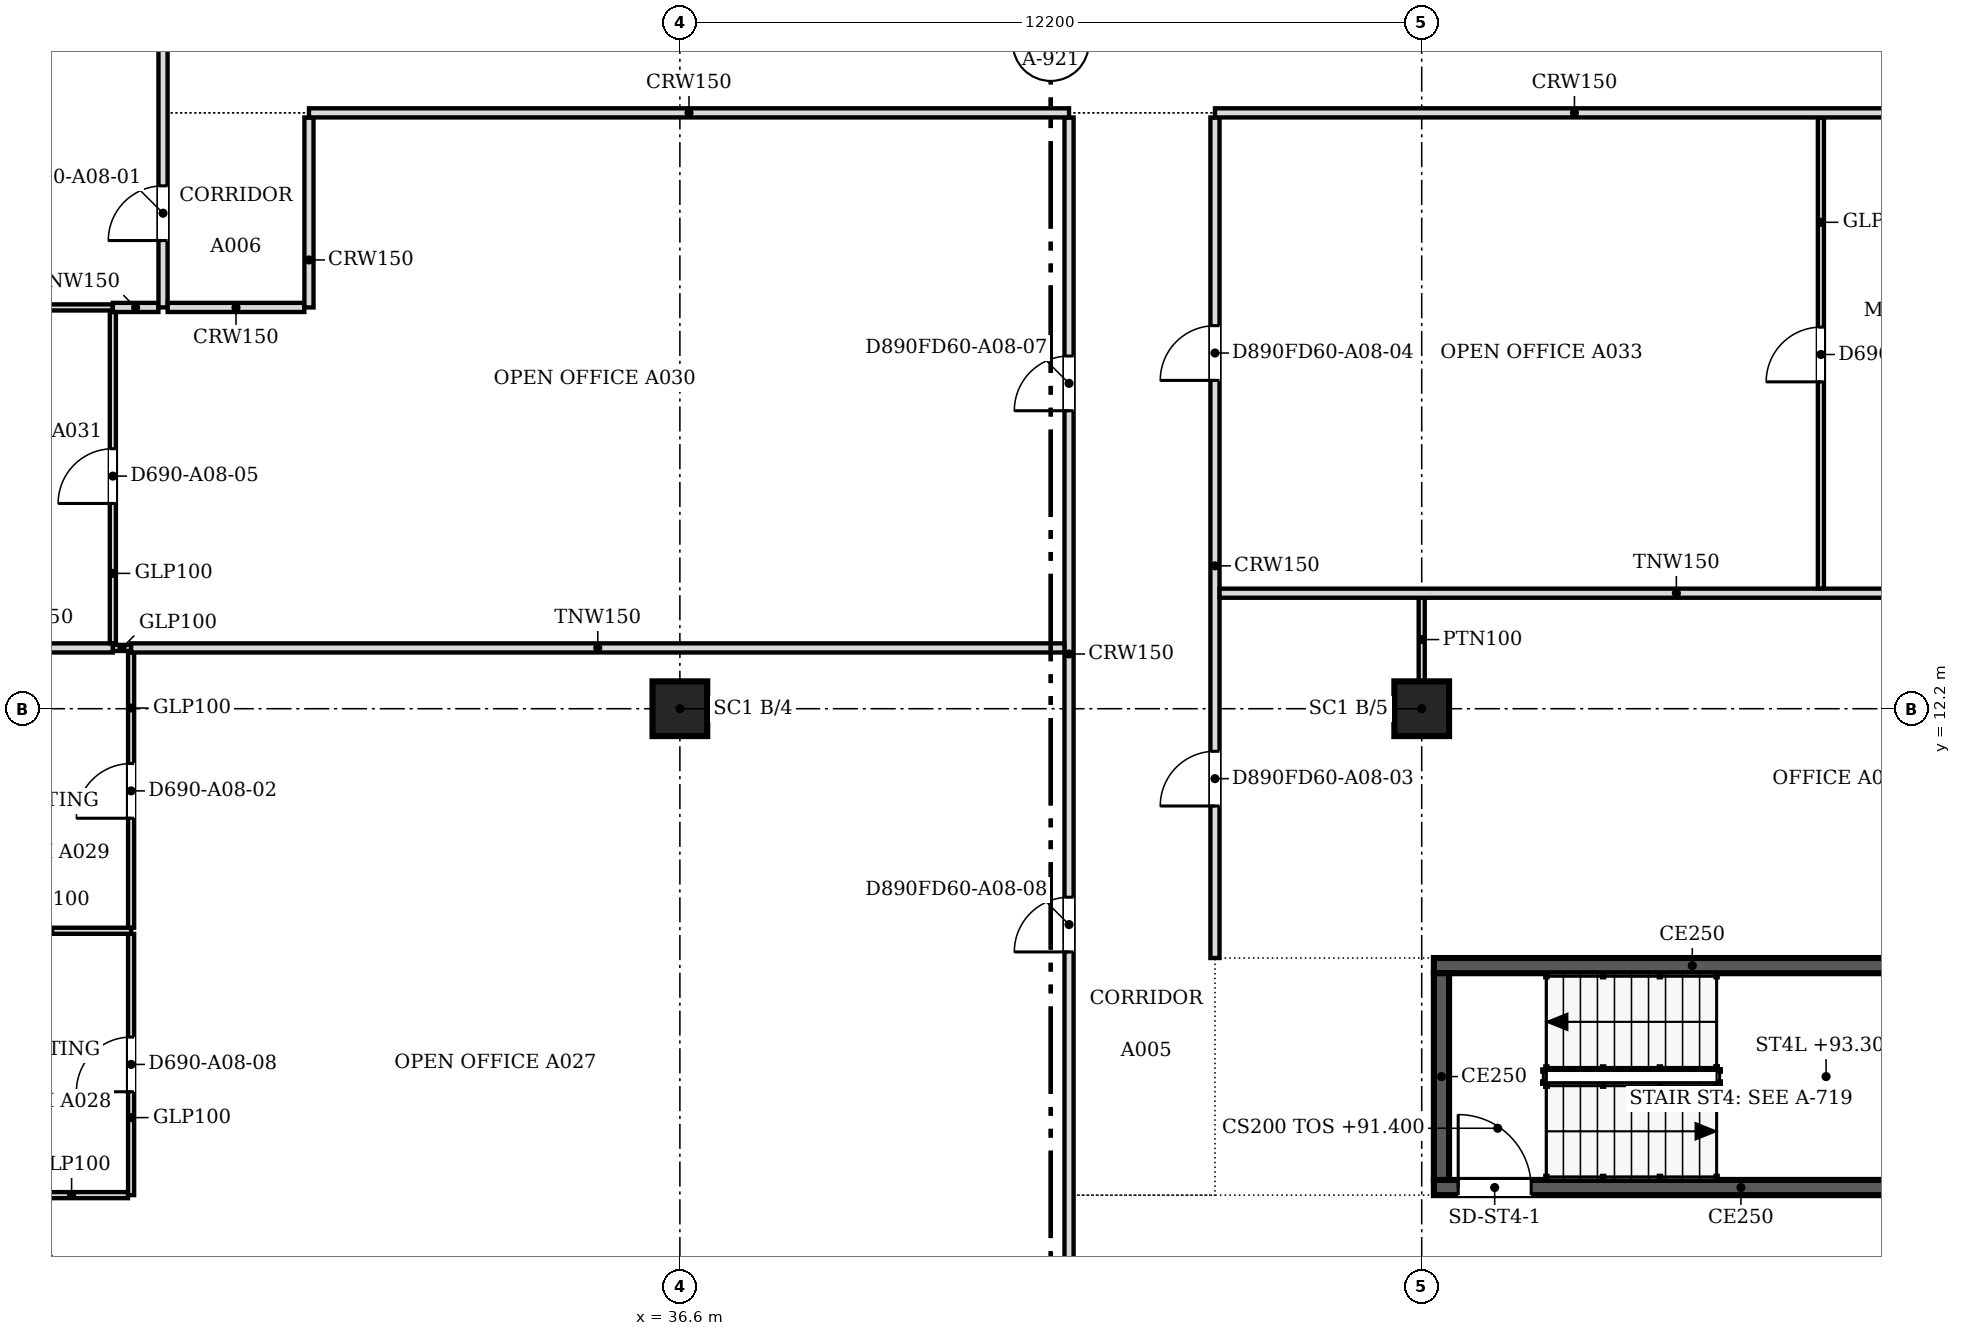
"""IFC4 building model, lengths in metres.
Left out: names, types, materials, properties, quantities, classifications, styles, units other than length and angle.
Written with IfcOpenShell. Run it as: python <this file> out.ifc"""

import sys

from ifc_helpers import new_model, si_unit, direction, frame, frame_2d, origin, origin_2d, place, context, subcontext, project, spatial, polyline, rectangle, outline, extrude, faceted_brep, source, transform, mapped, element, fill, save


model = new_model("IFC4")
c1 = context("Model", 3, precision=1e-05, world=origin(), true_north=direction((0.0, 1.0)))
c2 = subcontext(c1, "Body", "Model", "MODEL_VIEW")
j1 = project(units=[si_unit("LENGTHUNIT", "METRE"), si_unit("PLANEANGLEUNIT", "RADIAN")], contexts=[c1])
p1 = place(None, origin())
s1 = spatial("IfcSite", under=j1, at=p1, CompositionType="ELEMENT")
p2 = place(p1, origin())
s2 = spatial("IfcBuilding", under=s1, at=p2, CompositionType="ELEMENT")
p3 = place(p2, frame((0.0, 0.0, 91.4)))
s3 = spatial("IfcBuildingStorey", under=s2, at=p3, CompositionType="ELEMENT", Elevation=91.4)
for number, where, z_axis, x_axis in (
    (1, (36.6, 12.2, 0.0), (0.0, 0.0, 1.0), (1.0, 0.0, 0.0)),
    (2, (48.8, 12.2, 0.0), (0.0, 0.0, 1.0), (1.0, 0.0, 0.0)),
):
    element("IfcColumn", number, at=place(p3, frame(where, z_axis=z_axis, x_axis=x_axis)), inside=s3, PredefinedType="COLUMN", context=c2, shape_type="SweptSolid", body=[
        extrude(rectangle(XDim=0.9, YDim=0.9, at=origin_2d()), origin(), (0.0, 0.0, 1.0), 3.6),
    ])
m1 = source(origin(), c2, "Body", "Brep", [
    faceted_brep([(0.053, -0.25, 0.0), (2.997, -0.25, 3.8), (0.053, -0.25, 7.6), (0.0, -0.25, 7.532), (0.0, -0.25, 0.068), (0.106, 0.25, 7.531), (2.944, 0.25, 3.868), (2.944, 0.25, 3.732), (0.106, 0.25, 0.068), (2.997, 0.0, 3.8), (0.053, 0.0, 0.0), (0.053, 0.0, 7.6)], [[[0, 1, 2, 3, 4]], [[5, 6, 7, 8]], [[8, 7, 9, 1, 0, 10]], [[6, 5, 11, 2, 1, 9]], [[3, 2, 11]], [[10, 0, 4]], [[8, 10, 4, 3, 11, 5]], [[9, 7, 6]]]),
])
p4 = place(p3, frame((25.675, 3.431, -3.8), z_axis=(0.0, 0.0, 1.0), x_axis=(0.707106781187, -0.707106781187, 0.0)))
e3 = element("IfcWall", 3, at=p4, inside=s3, PredefinedType="SOLIDWALL", context=c2, shape_type="MappedRepresentation", body=[
    mapped(m1, transform((0.0, 0.0, 0.0), scale=1.0)),
])
m2 = source(origin(), c2, "Body", "SweptSolid", [
    extrude(outline(polyline([(0.253, 0.666), (2.681, 3.8), (0.253, 6.934), (0.253, 0.666)])), frame((0.0, 0.26, 0.0), z_axis=(0.0, -1.0, 0.0), x_axis=(1.0, 0.0, 0.0)), (0.0, 0.0, 1.0), 0.52),
])
p5 = place(p4, origin())
e4 = element("IfcOpeningElement", 4, at=p5, cuts=e3, PredefinedType="OPENING", context=c2, shape_type="MappedRepresentation", body=[
    mapped(m2, transform((0.0, 0.0, 0.0), scale=1.0)),
])
p6 = place(p2, frame((0.0, 0.0, 95.2)))
s4 = spatial("IfcBuildingStorey", under=s2, at=p6, CompositionType="ELEMENT", Elevation=95.2)
m3 = source(origin(), c2, "Body", "Brep", [
    faceted_brep([(2.944, -0.25, 0.0), (2.997, -0.25, 0.068), (2.997, -0.25, 7.532), (2.944, -0.25, 7.6), (0.0, -0.25, 3.8), (0.053, 0.25, 3.868), (2.891, 0.25, 7.532), (2.891, 0.25, 0.068), (0.053, 0.25, 3.732), (2.944, 0.0, 0.0), (2.944, 0.0, 7.6), (0.0, 0.0, 3.8)], [[[0, 1, 2, 3, 4]], [[5, 6, 7, 8]], [[1, 0, 9]], [[10, 3, 2]], [[6, 5, 11, 4, 3, 10]], [[8, 7, 9, 0, 4, 11]], [[8, 11, 5]], [[1, 9, 7, 6, 10, 2]]]),
])
p7 = place(p6, frame((25.712, 3.394, -3.8), z_axis=(0.0, 0.0, 1.0), x_axis=(0.707066050402, -0.707147509625, 0.0)))
e5 = element("IfcWall", 5, at=p7, inside=s4, PredefinedType="SOLIDWALL", context=c2, shape_type="MappedRepresentation", body=[
    mapped(m3, transform((0.0, 0.0, 0.0), scale=1.0)),
])
m4 = source(origin(), c2, "Body", "SweptSolid", [
    extrude(outline(polyline([(2.744, 6.934), (0.316, 3.8), (2.744, 0.667), (2.744, 6.934)])), frame((0.0, 0.26, 0.0), z_axis=(0.0, -1.0, 0.0), x_axis=(1.0, 0.0, 0.0)), (0.0, 0.0, 1.0), 0.52),
])
p8 = place(p7, origin())
e6 = element("IfcOpeningElement", 6, at=p8, cuts=e5, PredefinedType="OPENING", context=c2, shape_type="MappedRepresentation", body=[
    mapped(m4, transform((0.0, 0.0, 0.0), scale=1.0)),
])
p9 = place(p3, frame((57.5, 4.325, 0.0), z_axis=(0.0, 0.0, 1.0), x_axis=(-1.0, 0.0, 0.0)))
e7 = element("IfcWall", 7, at=p9, inside=s3, PredefinedType="SOLIDWALL", context=c2, shape_type="SweptSolid", body=[
    extrude(rectangle(XDim=8.5, YDim=0.25, at=frame_2d((4.25, 0.0))), origin(), (0.0, 0.0, 1.0), 3.8),
])
m5 = source(origin(), c2, "Body", "SweptSolid", [
    extrude(rectangle(XDim=1.2, YDim=2.1, at=frame_2d((0.6, 1.05))), frame((0.0, 0.135, 0.0), z_axis=(0.0, -1.0, 0.0), x_axis=(1.0, 0.0, 0.0)), (0.0, 0.0, 1.0), 0.27),
])
p10 = place(p9, frame((6.9, 0.0, 0.0)))
e8 = element("IfcOpeningElement", 8, at=p10, cuts=e7, PredefinedType="OPENING", context=c2, shape_type="MappedRepresentation", body=[
    mapped(m5, transform((0.0, 0.0, 0.0), scale=1.0)),
])
p11 = place(p3, frame((49.125, 4.45, 0.0), z_axis=(0.0, 0.0, 1.0), x_axis=(0.0, 1.0, 0.0)))
e9 = element("IfcWall", 9, at=p11, inside=s3, PredefinedType="SOLIDWALL", context=c2, shape_type="SweptSolid", body=[
    extrude(rectangle(XDim=3.4, YDim=0.25, at=frame_2d((1.7, 0.0))), origin(), (0.0, 0.0, 1.0), 3.8),
])
p12 = place(p3, frame((49.0, 7.975, 0.0), z_axis=(0.0, 0.0, 1.0), x_axis=(1.0, 0.0, 0.0)))
e10 = element("IfcWall", 10, at=p12, inside=s3, PredefinedType="SOLIDWALL", context=c2, shape_type="SweptSolid", body=[
    extrude(rectangle(XDim=8.5, YDim=0.25, at=frame_2d((4.25, 0.0))), origin(), (0.0, 0.0, 1.0), 3.8),
])
p13 = place(p3, frame((43.0, 0.5, 0.0), z_axis=(0.0, 0.0, 1.0), x_axis=(0.0, 1.0, 0.0)))
e11 = element("IfcWall", 11, at=p13, inside=s3, PredefinedType="PARTITIONING", context=c2, shape_type="SweptSolid", body=[
    extrude(rectangle(XDim=21.424, YDim=0.15, at=frame_2d((10.712, 0.0))), origin(), (0.0, 0.0, 1.0), 2.895),
])
m6 = source(origin(), c2, "Body", "SweptSolid", [
    extrude(rectangle(XDim=0.9, YDim=2.1, at=frame_2d((0.45, 1.05))), frame((0.0, 0.085, 0.0), z_axis=(0.0, -1.0, 0.0), x_axis=(1.0, 0.0, 0.0)), (0.0, 0.0, 1.0), 0.17),
])
p14 = place(p13, frame((16.601, 0.0, 0.0)))
e12 = element("IfcOpeningElement", 12, at=p14, cuts=e11, PredefinedType="OPENING", context=c2, shape_type="MappedRepresentation", body=[
    mapped(m6, transform((0.0, 0.0, 0.0), scale=1.0)),
])
p15 = place(p13, frame((7.7, 0.0, 0.0)))
e13 = element("IfcOpeningElement", 13, at=p15, cuts=e11, PredefinedType="OPENING", context=c2, shape_type="MappedRepresentation", body=[
    mapped(m6, transform((0.0, 0.0, 0.0), scale=1.0)),
])
p16 = place(p3, frame((25.669, 4.2, 0.0), z_axis=(0.0, 0.0, 1.0), x_axis=(1.0, 0.0, 0.0)))
e14 = element("IfcWall", 14, at=p16, inside=s3, PredefinedType="PARTITIONING", context=c2, shape_type="SweptSolid", body=[
    extrude(rectangle(XDim=1.855, YDim=0.1, at=frame_2d((0.928, 0.0))), origin(), (0.0, 0.0, 1.0), 2.895),
])
p17 = place(p3, frame((27.575, 4.2, 0.0), z_axis=(0.0, 0.0, 1.0), x_axis=(0.0, 1.0, 0.0)))
e15 = element("IfcWall", 15, at=p17, inside=s3, PredefinedType="PARTITIONING", context=c2, shape_type="SweptSolid", body=[
    extrude(rectangle(XDim=4.297, YDim=0.1, at=frame_2d((2.148, 0.0))), origin(), (0.0, 0.0, 1.0), 2.895),
])
m7 = source(origin(), c2, "Body", "SweptSolid", [
    extrude(rectangle(XDim=0.9, YDim=2.1, at=frame_2d((0.45, 1.05))), frame((0.0, 0.06, 0.0), z_axis=(0.0, -1.0, 0.0), x_axis=(1.0, 0.0, 0.0)), (0.0, 0.0, 1.0), 0.12),
])
p18 = place(p17, frame((1.7, 0.0, 0.0)))
e16 = element("IfcOpeningElement", 16, at=p18, cuts=e15, PredefinedType="OPENING", context=c2, shape_type="MappedRepresentation", body=[
    mapped(m7, transform((0.0, 0.0, 0.0), scale=1.0)),
])
p19 = place(p3, frame((45.4, 21.924, 0.0), z_axis=(0.0, 0.0, 1.0), x_axis=(0.0, -1.0, 0.0)))
e17 = element("IfcWall", 17, at=p19, inside=s3, PredefinedType="PARTITIONING", context=c2, shape_type="SweptSolid", body=[
    extrude(rectangle(XDim=13.824, YDim=0.15, at=frame_2d((6.912, 0.0))), origin(), (0.0, 0.0, 1.0), 2.895),
])
p20 = place(p19, frame((10.424, 0.0, 0.0)))
e18 = element("IfcOpeningElement", 18, at=p20, cuts=e17, PredefinedType="OPENING", context=c2, shape_type="MappedRepresentation", body=[
    mapped(m6, transform((0.0, 0.0, 0.0), scale=1.0)),
])
p21 = place(p19, frame((3.424, 0.0, 0.0)))
e19 = element("IfcOpeningElement", 19, at=p21, cuts=e17, PredefinedType="OPENING", context=c2, shape_type="MappedRepresentation", body=[
    mapped(m6, transform((0.0, 0.0, 0.0), scale=1.0)),
])
p22 = place(p3, frame((24.9, 8.548, 0.0), z_axis=(0.0, 0.0, 1.0), x_axis=(1.0, 0.0, 0.0)))
e20 = element("IfcWall", 20, at=p22, inside=s3, PredefinedType="PARTITIONING", context=c2, shape_type="SweptSolid", body=[
    extrude(rectangle(XDim=2.675, YDim=0.1, at=frame_2d((1.337, 0.0))), origin(), (0.0, 0.0, 1.0), 2.895),
])
p23 = place(p3, frame((27.575, 8.599, 0.0), z_axis=(0.0, 0.0, 1.0), x_axis=(0.0, 1.0, 0.0)))
e21 = element("IfcWall", 21, at=p23, inside=s3, PredefinedType="PARTITIONING", context=c2, shape_type="SweptSolid", body=[
    extrude(rectangle(XDim=4.525, YDim=0.1, at=frame_2d((2.263, 0.0))), origin(), (0.0, 0.0, 1.0), 2.895),
])
p24 = place(p23, frame((1.8, 0.0, 0.0)))
e22 = element("IfcOpeningElement", 22, at=p24, cuts=e21, PredefinedType="OPENING", context=c2, shape_type="MappedRepresentation", body=[
    mapped(m7, transform((0.0, 0.0, 0.0), scale=1.0)),
])
p25 = place(p3, frame((48.8, 12.65, 0.0), z_axis=(0.0, 0.0, 1.0), x_axis=(0.0, 1.0, 0.0)))
e23 = element("IfcWall", 23, at=p25, inside=s3, PredefinedType="PARTITIONING", context=c2, shape_type="SweptSolid", body=[
    extrude(rectangle(XDim=1.375, YDim=0.1, at=frame_2d((0.688, 0.0))), origin(), (0.0, 0.0, 1.0), 2.895),
])
p26 = place(p3, frame((24.55, 13.2, 0.0), z_axis=(0.0, 0.0, 1.0), x_axis=(1.0, 0.0, 0.0)))
e24 = element("IfcWall", 24, at=p26, inside=s3, PredefinedType="PARTITIONING", context=c2, shape_type="SweptSolid", body=[
    extrude(rectangle(XDim=2.725, YDim=0.15, at=frame_2d((1.362, 0.0))), origin(), (0.0, 0.0, 1.0), 2.895),
])
p27 = place(p3, frame((27.276, 13.2, 0.0), z_axis=(0.0, 0.0, 1.0), x_axis=(1.0, 0.0, 0.0)))
e25 = element("IfcWall", 25, at=p27, inside=s3, PredefinedType="PARTITIONING", context=c2, shape_type="SweptSolid", body=[
    extrude(rectangle(XDim=0.298, YDim=0.1, at=frame_2d((0.149, 0.0))), origin(), (0.0, 0.0, 1.0), 2.895),
])
p28 = place(p3, frame((27.575, 13.2, 0.0), z_axis=(0.0, 0.0, 1.0), x_axis=(1.0, 0.0, 0.0)))
e26 = element("IfcWall", 26, at=p28, inside=s3, PredefinedType="PARTITIONING", context=c2, shape_type="SweptSolid", body=[
    extrude(rectangle(XDim=15.349, YDim=0.15, at=frame_2d((7.675, 0.0))), origin(), (0.0, 0.0, 1.0), 2.895),
])
p29 = place(p3, frame((27.275, 13.276, 0.0), z_axis=(0.0, 0.0, 1.0), x_axis=(0.0, 1.0, 0.0)))
e27 = element("IfcWall", 27, at=p29, inside=s3, PredefinedType="PARTITIONING", context=c2, shape_type="SweptSolid", body=[
    extrude(rectangle(XDim=5.448, YDim=0.1, at=frame_2d((2.724, 0.0))), origin(), (0.0, 0.0, 1.0), 2.895),
])
p30 = place(p29, frame((2.3, 0.0, 0.0)))
e28 = element("IfcOpeningElement", 28, at=p30, cuts=e27, PredefinedType="OPENING", context=c2, shape_type="MappedRepresentation", body=[
    mapped(m7, transform((0.0, 0.0, 0.0), scale=1.0)),
])
p31 = place(p3, frame((45.476, 14.1, 0.0), z_axis=(0.0, 0.0, 1.0), x_axis=(1.0, 0.0, 0.0)))
e29 = element("IfcWall", 29, at=p31, inside=s3, PredefinedType="PARTITIONING", context=c2, shape_type="SweptSolid", body=[
    extrude(rectangle(XDim=15.024, YDim=0.15, at=frame_2d((7.512, 0.0))), origin(), (0.0, 0.0, 1.0), 2.895),
])
p32 = place(p3, frame((55.365, 21.924, 0.0), z_axis=(0.0, 0.0, 1.0), x_axis=(0.0, -1.0, 0.0)))
e30 = element("IfcWall", 30, at=p32, inside=s3, PredefinedType="PARTITIONING", context=c2, shape_type="SweptSolid", body=[
    extrude(rectangle(XDim=7.748, YDim=0.1, at=frame_2d((3.874, 0.0))), origin(), (0.0, 0.0, 1.0), 2.895),
])
p33 = place(p32, frame((3.448, 0.0, 0.0)))
e31 = element("IfcOpeningElement", 31, at=p33, cuts=e30, PredefinedType="OPENING", context=c2, shape_type="MappedRepresentation", body=[
    mapped(m7, transform((0.0, 0.0, 0.0), scale=1.0)),
])
p34 = place(p3, frame((22.0, 18.8, 0.0), z_axis=(0.0, 0.0, 1.0), x_axis=(1.0, 0.0, 0.0)))
e32 = element("IfcWall", 32, at=p34, inside=s3, PredefinedType="PARTITIONING", context=c2, shape_type="SweptSolid", body=[
    extrude(rectangle(XDim=5.274, YDim=0.1, at=frame_2d((2.637, 0.0))), origin(), (0.0, 0.0, 1.0), 2.895),
])
p35 = place(p3, frame((27.275, 18.8, 0.0), z_axis=(0.0, 0.0, 1.0), x_axis=(1.0, 0.0, 0.0)))
e33 = element("IfcWall", 33, at=p35, inside=s3, PredefinedType="PARTITIONING", context=c2, shape_type="SweptSolid", body=[
    extrude(rectangle(XDim=0.749, YDim=0.15, at=frame_2d((0.375, 0.0))), origin(), (0.0, 0.0, 1.0), 2.895),
])
p36 = place(p3, frame((28.1, 18.8, 0.0), z_axis=(0.0, 0.0, 1.0), x_axis=(0.0, 1.0, 0.0)))
e34 = element("IfcWall", 34, at=p36, inside=s3, PredefinedType="PARTITIONING", context=c2, shape_type="SweptSolid", body=[
    extrude(rectangle(XDim=26.424, YDim=0.15, at=frame_2d((13.212, 0.0))), origin(), (0.0, 0.0, 1.0), 2.895),
])
p37 = place(p36, frame((1.1, 0.0, 0.0)))
e35 = element("IfcOpeningElement", 35, at=p37, cuts=e34, PredefinedType="OPENING", context=c2, shape_type="MappedRepresentation", body=[
    mapped(m6, transform((0.0, 0.0, 0.0), scale=1.0)),
])
p38 = place(p36, frame((23.151, 0.0, 0.0)))
e36 = element("IfcOpeningElement", 36, at=p38, cuts=e34, PredefinedType="OPENING", context=c2, shape_type="MappedRepresentation", body=[
    mapped(m6, transform((0.0, 0.0, 0.0), scale=1.0)),
])
m8 = source(origin(), c2, "Body", "SweptSolid", [
    extrude(rectangle(XDim=1.0, YDim=2.1, at=frame_2d((0.5, 1.05))), frame((0.0, 0.085, 0.0), z_axis=(0.0, -1.0, 0.0), x_axis=(1.0, 0.0, 0.0)), (0.0, 0.0, 1.0), 0.17),
])
p39 = place(p36, frame((17.251, 0.0, 0.0)))
e37 = element("IfcOpeningElement", 37, at=p39, cuts=e34, PredefinedType="OPENING", context=c2, shape_type="MappedRepresentation", body=[
    mapped(m8, transform((0.0, 0.0, 0.0), scale=1.0)),
])
p40 = place(p36, frame((9.7, 0.0, 0.0)))
e38 = element("IfcOpeningElement", 38, at=p40, cuts=e34, PredefinedType="OPENING", context=c2, shape_type="MappedRepresentation", body=[
    mapped(m6, transform((0.0, 0.0, 0.0), scale=1.0)),
])
p41 = place(p3, frame((28.176, 18.8, 0.0), z_axis=(0.0, 0.0, 1.0), x_axis=(1.0, 0.0, 0.0)))
e39 = element("IfcWall", 39, at=p41, inside=s3, PredefinedType="PARTITIONING", context=c2, shape_type="SweptSolid", body=[
    extrude(rectangle(XDim=2.248, YDim=0.15, at=frame_2d((1.124, 0.0))), origin(), (0.0, 0.0, 1.0), 2.895),
])
p42 = place(p3, frame((30.5, 18.8, 0.0), z_axis=(0.0, 0.0, 1.0), x_axis=(0.0, 1.0, 0.0)))
e40 = element("IfcWall", 40, at=p42, inside=s3, PredefinedType="PARTITIONING", context=c2, shape_type="SweptSolid", body=[
    extrude(rectangle(XDim=3.124, YDim=0.15, at=frame_2d((1.562, 0.0))), origin(), (0.0, 0.0, 1.0), 2.895),
])
p43 = place(p3, frame((30.5, 22.0, 0.0), z_axis=(0.0, 0.0, 1.0), x_axis=(1.0, 0.0, 0.0)))
e41 = element("IfcWall", 41, at=p43, inside=s3, PredefinedType="PARTITIONING", context=c2, shape_type="SweptSolid", body=[
    extrude(rectangle(XDim=12.5, YDim=0.15, at=frame_2d((6.25, 0.0))), origin(), (0.0, 0.0, 1.0), 2.895),
])
p44 = place(p3, frame((45.4, 22.0, 0.0), z_axis=(0.0, 0.0, 1.0), x_axis=(1.0, 0.0, 0.0)))
e42 = element("IfcWall", 42, at=p44, inside=s3, PredefinedType="PARTITIONING", context=c2, shape_type="SweptSolid", body=[
    extrude(rectangle(XDim=11.824, YDim=0.15, at=frame_2d((5.912, 0.0))), origin(), (0.0, 0.0, 1.0), 2.895),
])
m9 = source(origin(), c2, "Body", "SweptSolid", [
    extrude(rectangle(XDim=1.2, YDim=2.1, at=frame_2d((0.6, 1.05))), frame((0.0, 0.025, 0.0), z_axis=(0.0, -1.0, 0.0), x_axis=(1.0, 0.0, 0.0)), (0.0, 0.0, 1.0), 0.05),
])
p45 = place(p10, origin())
e43 = element("IfcDoor", 43, at=p45, inside=s3, OperationType="SINGLE_SWING_RIGHT", PredefinedType="DOOR", context=c2, shape_type="MappedRepresentation", body=[
    mapped(m9, transform((0.0, 0.0, 0.0), scale=1.0)),
])
fill(e8, e43)
m10 = source(origin(), c2, "Body", "SweptSolid", [
    extrude(rectangle(XDim=0.9, YDim=2.1, at=frame_2d((0.45, 1.05))), frame((0.0, 0.025, 0.0), z_axis=(0.0, -1.0, 0.0), x_axis=(1.0, 0.0, 0.0)), (0.0, 0.0, 1.0), 0.05),
])
p46 = place(p37, origin())
e44 = element("IfcDoor", 44, at=p46, inside=s3, OperationType="SINGLE_SWING_LEFT", PredefinedType="DOOR", context=c2, shape_type="MappedRepresentation", body=[
    mapped(m10, transform((0.0, 0.0, 0.0), scale=1.0)),
])
fill(e35, e44)
p47 = place(p24, origin())
e45 = element("IfcDoor", 45, at=p47, inside=s3, OperationType="SINGLE_SWING_LEFT", PredefinedType="DOOR", context=c2, shape_type="MappedRepresentation", body=[
    mapped(m10, transform((0.0, 0.0, 0.0), scale=1.0)),
])
fill(e22, e45)
p48 = place(p30, origin())
e46 = element("IfcDoor", 46, at=p48, inside=s3, OperationType="SINGLE_SWING_LEFT", PredefinedType="DOOR", context=c2, shape_type="MappedRepresentation", body=[
    mapped(m10, transform((0.0, 0.0, 0.0), scale=1.0)),
])
fill(e28, e46)
p49 = place(p20, origin())
e47 = element("IfcDoor", 47, at=p49, inside=s3, OperationType="SINGLE_SWING_RIGHT", PredefinedType="DOOR", context=c2, shape_type="MappedRepresentation", body=[
    mapped(m10, transform((0.0, 0.0, 0.0), scale=1.0)),
])
fill(e18, e47)
p50 = place(p18, origin())
e48 = element("IfcDoor", 48, at=p50, inside=s3, OperationType="SINGLE_SWING_LEFT", PredefinedType="DOOR", context=c2, shape_type="MappedRepresentation", body=[
    mapped(m10, transform((0.0, 0.0, 0.0), scale=1.0)),
])
fill(e16, e48)
p51 = place(p33, origin())
e49 = element("IfcDoor", 49, at=p51, inside=s3, OperationType="SINGLE_SWING_RIGHT", PredefinedType="DOOR", context=c2, shape_type="MappedRepresentation", body=[
    mapped(m10, transform((0.0, 0.0, 0.0), scale=1.0)),
])
fill(e31, e49)
p52 = place(p21, origin())
e50 = element("IfcDoor", 50, at=p52, inside=s3, OperationType="SINGLE_SWING_RIGHT", PredefinedType="DOOR", context=c2, shape_type="MappedRepresentation", body=[
    mapped(m10, transform((0.0, 0.0, 0.0), scale=1.0)),
])
fill(e19, e50)
p53 = place(p14, origin())
e51 = element("IfcDoor", 51, at=p53, inside=s3, OperationType="SINGLE_SWING_LEFT", PredefinedType="DOOR", context=c2, shape_type="MappedRepresentation", body=[
    mapped(m10, transform((0.0, 0.0, 0.0), scale=1.0)),
])
fill(e12, e51)
p54 = place(p15, origin())
e52 = element("IfcDoor", 52, at=p54, inside=s3, OperationType="SINGLE_SWING_LEFT", PredefinedType="DOOR", context=c2, shape_type="MappedRepresentation", body=[
    mapped(m10, transform((0.0, 0.0, 0.0), scale=1.0)),
])
fill(e13, e52)
save(model, sys.argv[1])
